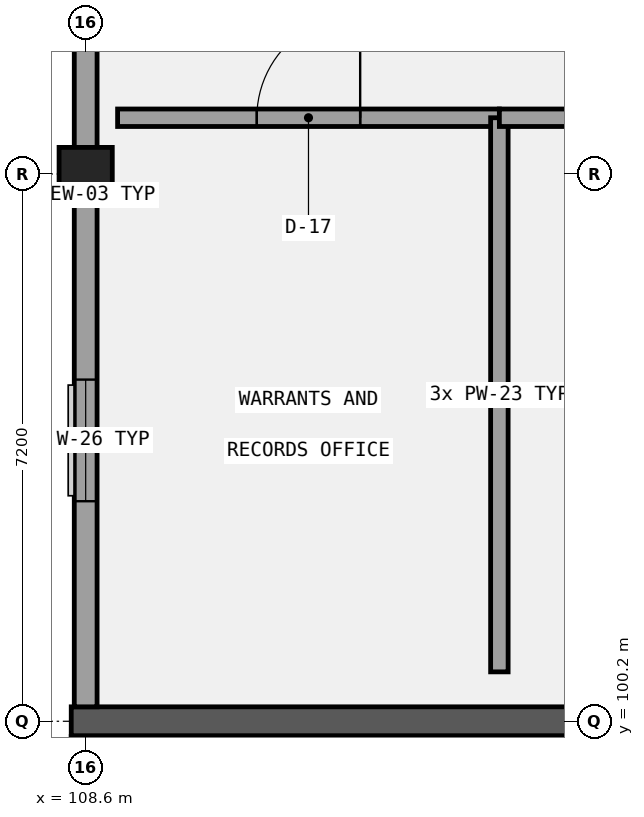
"""IFC4 building model, lengths in metres.
Left out: names, types, materials, properties, quantities, classifications, styles, units other than length and angle.
Written with IfcOpenShell. Run it as: python <this file> out.ifc"""

import sys

from ifc_helpers import new_model, si_unit, direction, frame, frame_2d, origin, origin_2d, place, context, subcontext, project, spatial, rectangle, extrude, element, fill, save


model = new_model("IFC4")
c1 = context("Model", 3, precision=1e-05, world=origin(), true_north=direction((0.0, 1.0)))
c2 = subcontext(c1, "Body", "Model", "MODEL_VIEW")
j1 = project(units=[si_unit("LENGTHUNIT", "METRE"), si_unit("PLANEANGLEUNIT", "RADIAN")], contexts=[c1])
p1 = place(None, origin())
s1 = spatial("IfcSite", under=j1, at=p1, CompositionType="ELEMENT")
p2 = place(p1, origin())
s2 = spatial("IfcBuilding", under=s1, at=p2, CompositionType="ELEMENT")
p3 = place(p2, frame((0.0, 0.0, 13.8)))
s3 = spatial("IfcBuildingStorey", under=s2, at=p3, CompositionType="ELEMENT", Elevation=13.8)
p4 = place(p3, frame((108.41, 100.2, 0.0), z_axis=(0.0, 0.0, 1.0), x_axis=(1.0, 0.0, 0.0)))
e1 = element("IfcWall", 1, at=p4, inside=s3, PredefinedType="SHEAR", context=c2, shape_type="SweptSolid", body=[
    extrude(rectangle(XDim=14.78, YDim=0.38, at=frame_2d((7.39, 0.0))), origin(), (0.0, 0.0, 1.0), 4.2),
])
p5 = place(p3, frame((108.6, 93.2, 0.0), z_axis=(0.0, 0.0, 1.0), x_axis=(0.0, 1.0, 0.0)))
e2 = element("IfcWall", 2, at=p5, inside=s3, PredefinedType="SHEAR", context=c2, shape_type="SweptSolid", body=[
    extrude(rectangle(XDim=6.8, YDim=0.38, at=frame_2d((3.4, 0.0))), origin(), (0.0, 0.0, 1.0), 4.2),
])
p6 = place(p3, frame((108.6, 107.4, 0.0), z_axis=(0.0, 0.0, 1.0), x_axis=(1.0, 0.0, 0.0)))
e3 = element("IfcColumn", 3, at=p6, inside=s3, PredefinedType="COLUMN", context=c2, shape_type="SweptSolid", body=[
    extrude(rectangle(XDim=0.7, YDim=0.7, at=origin_2d()), origin(), (0.0, 0.0, 1.0), 4.2),
])
p7 = place(p3, frame((108.6, 113.85, 0.0), z_axis=(0.0, 0.0, 1.0), x_axis=(0.0, -1.0, 0.0)))
e4 = element("IfcWall", 4, at=p7, inside=s3, PredefinedType="SOLIDWALL", context=c2, shape_type="SweptSolid", body=[
    extrude(rectangle(XDim=13.46, YDim=0.3, at=frame_2d((6.73, 0.0))), origin(), (0.0, 0.0, 1.0), 3.29),
])
p8 = place(p7, frame((9.155, 0.0, 0.95)))
e5 = element("IfcOpeningElement", 5, at=p8, cuts=e4, PredefinedType="OPENING", context=c2, shape_type="SweptSolid", body=[
    extrude(rectangle(XDim=1.6, YDim=1.4, at=frame_2d((0.8, 0.7))), frame((0.0, 0.16, 0.0), z_axis=(0.0, -1.0, 0.0), x_axis=(1.0, 0.0, 0.0)), (0.0, 0.0, 1.0), 0.32),
])
p9 = place(p7, frame((2.425, 0.0, 0.95)))
e6 = element("IfcOpeningElement", 6, at=p9, cuts=e4, PredefinedType="OPENING", context=c2, shape_type="SweptSolid", body=[
    extrude(rectangle(XDim=1.6, YDim=1.65, at=frame_2d((0.8, 0.825))), frame((0.0, 0.16, 0.0), z_axis=(0.0, -1.0, 0.0), x_axis=(1.0, 0.0, 0.0)), (0.0, 0.0, 1.0), 0.32),
])
p10 = place(p3, frame((109.02, 108.14, 0.0), z_axis=(0.0, 0.0, 1.0), x_axis=(1.0, 0.0, 0.0)))
e7 = element("IfcWall", 7, at=p10, inside=s3, PredefinedType="PARTITIONING", context=c2, shape_type="SweptSolid", body=[
    extrude(rectangle(XDim=5.023, YDim=0.23, at=frame_2d((2.511, 0.0))), origin(), (0.0, 0.0, 1.0), 3.94),
])
p11 = place(p10, frame((1.832, 0.0, 0.0)))
e8 = element("IfcOpeningElement", 8, at=p11, cuts=e7, PredefinedType="OPENING", context=c2, shape_type="SweptSolid", body=[
    extrude(rectangle(XDim=1.36, YDim=2.22, at=frame_2d((0.68, 1.11))), frame((0.0, 0.125, 0.0), z_axis=(0.0, -1.0, 0.0), x_axis=(1.0, 0.0, 0.0)), (0.0, 0.0, 1.0), 0.25),
])
p12 = place(p3, frame((114.043, 100.85, 0.0), z_axis=(0.0, 0.0, 1.0), x_axis=(0.0, 1.0, 0.0)))
e9 = element("IfcWall", 9, at=p12, inside=s3, PredefinedType="PARTITIONING", context=c2, shape_type="SweptSolid", body=[
    extrude(rectangle(XDim=7.29, YDim=0.23, at=frame_2d((3.645, 0.0))), origin(), (0.0, 0.0, 1.0), 3.94),
])
p13 = place(p3, frame((114.043, 108.14, 0.0), z_axis=(0.0, 0.0, 1.0), x_axis=(1.0, 0.0, 0.0)))
e10 = element("IfcWall", 10, at=p13, inside=s3, PredefinedType="PARTITIONING", context=c2, shape_type="SweptSolid", body=[
    extrude(rectangle(XDim=5.023, YDim=0.23, at=frame_2d((2.511, 0.0))), origin(), (0.0, 0.0, 1.0), 3.94),
])
p14 = place(p13, frame((3.307, 0.0, 0.0)))
e11 = element("IfcOpeningElement", 11, at=p14, cuts=e10, PredefinedType="OPENING", context=c2, shape_type="SweptSolid", body=[
    extrude(rectangle(XDim=0.92, YDim=2.1, at=frame_2d((0.46, 1.05))), frame((0.0, 0.125, 0.0), z_axis=(0.0, -1.0, 0.0), x_axis=(1.0, 0.0, 0.0)), (0.0, 0.0, 1.0), 0.25),
])
p15 = place(p8, origin())
e12 = element("IfcWindow", 12, at=p15, inside=s3, PartitioningType="SINGLE_PANEL", PredefinedType="WINDOW", context=c2, shape_type="SweptSolid", body=[
    extrude(rectangle(XDim=1.6, YDim=1.4, at=frame_2d((0.8, 0.7))), frame((0.0, 0.03, 0.0), z_axis=(0.0, -1.0, 0.0), x_axis=(1.0, 0.0, 0.0)), (0.0, 0.0, 1.0), 0.06),
])
fill(e5, e12)
p16 = place(p11, frame((1.36, 0.0, 0.0), z_axis=(0.0, 0.0, 1.0), x_axis=(-1.0, 0.0, 0.0)))
e13 = element("IfcDoor", 13, at=p16, inside=s3, OperationType="SINGLE_SWING_RIGHT", PredefinedType="DOOR", context=c2, shape_type="SweptSolid", body=[
    extrude(rectangle(XDim=1.36, YDim=2.22, at=frame_2d((0.68, 1.11))), frame((0.0, 0.025, 0.0), z_axis=(0.0, -1.0, 0.0), x_axis=(1.0, 0.0, 0.0)), (0.0, 0.0, 1.0), 0.05),
])
fill(e8, e13)
save(model, sys.argv[1])
